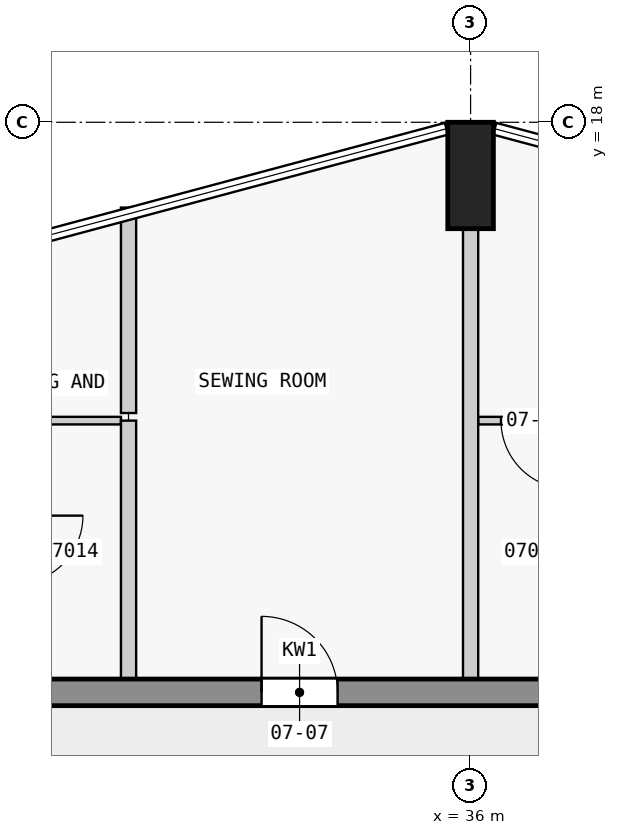
"""IFC4 building model, lengths in metres.
Left out: names, types, materials, properties, quantities, classifications, styles, units other than length and angle.
Written with IfcOpenShell. Run it as: python <this file> out.ifc"""

import sys

from ifc_helpers import new_model, si_unit, direction, frame, frame_2d, origin, origin_2d, place, context, subcontext, project, spatial, rectangle, extrude, element, fill, save


model = new_model("IFC4")
c1 = context("Model", 3, precision=1e-05, world=origin(), true_north=direction((0.0, 1.0)))
c2 = subcontext(c1, "Body", "Model", "MODEL_VIEW")
j1 = project(units=[si_unit("LENGTHUNIT", "METRE"), si_unit("PLANEANGLEUNIT", "RADIAN")], contexts=[c1])
p1 = place(None, origin())
s1 = spatial("IfcSite", under=j1, at=p1, CompositionType="ELEMENT")
p2 = place(p1, origin())
s2 = spatial("IfcBuilding", under=s1, at=p2, CompositionType="ELEMENT")
p3 = place(p2, frame((0.0, 0.0, 33.8)))
s3 = spatial("IfcBuildingStorey", under=s2, at=p3, CompositionType="ELEMENT", Elevation=33.8)
p4 = place(p3, frame((36.0, 17.3, 0.0), z_axis=(0.0, 0.0, 1.0), x_axis=(1.0, 0.0, 0.0)))
e1 = element("IfcColumn", 1, at=p4, inside=s3, PredefinedType="COLUMN", context=c2, shape_type="SweptSolid", body=[
    extrude(rectangle(XDim=0.6, YDim=1.4, at=origin_2d()), origin(), (0.0, 0.0, 1.0), 3.5),
])
p5 = place(p3, frame((22.5, 10.5, 0.0), z_axis=(0.0, 0.0, 1.0), x_axis=(1.0, 0.0, 0.0)))
e2 = element("IfcWall", 2, at=p5, inside=s3, PredefinedType="SHEAR", context=c2, shape_type="SweptSolid", body=[
    extrude(rectangle(XDim=22.5, YDim=0.35, at=frame_2d((11.25, 0.0))), origin(), (0.0, 0.0, 1.0), 3.25),
])
p6 = place(p5, frame((1.75, 0.0, 0.0)))
e3 = element("IfcOpeningElement", 3, at=p6, cuts=e2, PredefinedType="OPENING", context=c2, shape_type="SweptSolid", body=[
    extrude(rectangle(XDim=1.0, YDim=2.1, at=frame_2d((0.5, 1.05))), frame((0.0, 0.185, 0.0), z_axis=(0.0, -1.0, 0.0), x_axis=(1.0, 0.0, 0.0)), (0.0, 0.0, 1.0), 0.37),
])
p7 = place(p5, frame((6.25, 0.0, 0.0)))
e4 = element("IfcOpeningElement", 4, at=p7, cuts=e2, PredefinedType="OPENING", context=c2, shape_type="SweptSolid", body=[
    extrude(rectangle(XDim=1.0, YDim=2.1, at=frame_2d((0.5, 1.05))), frame((0.0, 0.185, 0.0), z_axis=(0.0, -1.0, 0.0), x_axis=(1.0, 0.0, 0.0)), (0.0, 0.0, 1.0), 0.37),
])
p8 = place(p5, frame((10.75, 0.0, 0.0)))
e5 = element("IfcOpeningElement", 5, at=p8, cuts=e2, PredefinedType="OPENING", context=c2, shape_type="SweptSolid", body=[
    extrude(rectangle(XDim=1.0, YDim=2.1, at=frame_2d((0.5, 1.05))), frame((0.0, 0.185, 0.0), z_axis=(0.0, -1.0, 0.0), x_axis=(1.0, 0.0, 0.0)), (0.0, 0.0, 1.0), 0.37),
])
p9 = place(p5, frame((16.85, 0.0, 0.0)))
e6 = element("IfcOpeningElement", 6, at=p9, cuts=e2, PredefinedType="OPENING", context=c2, shape_type="SweptSolid", body=[
    extrude(rectangle(XDim=1.0, YDim=2.1, at=frame_2d((0.5, 1.05))), frame((0.0, 0.185, 0.0), z_axis=(0.0, -1.0, 0.0), x_axis=(1.0, 0.0, 0.0)), (0.0, 0.0, 1.0), 0.37),
])
p10 = place(p3, frame((31.4, 14.075, 0.0), z_axis=(0.0, 0.0, 1.0), x_axis=(-1.0, 0.0, 0.0)))
e7 = element("IfcWall", 7, at=p10, inside=s3, PredefinedType="PARTITIONING", context=c2, shape_type="SweptSolid", body=[
    extrude(rectangle(XDim=1.35, YDim=0.1, at=frame_2d((0.675, 0.0))), origin(), (0.0, 0.0, 1.0), 3.25),
])
p11 = place(p3, frame((37.55, 14.075, 0.0), z_axis=(0.0, 0.0, 1.0), x_axis=(-1.0, 0.0, 0.0)))
e8 = element("IfcWall", 8, at=p11, inside=s3, PredefinedType="PARTITIONING", context=c2, shape_type="SweptSolid", body=[
    extrude(rectangle(XDim=1.45, YDim=0.1, at=frame_2d((0.725, 0.0))), origin(), (0.0, 0.0, 1.0), 3.25),
])
p12 = place(p11, frame((0.25, 0.0, 0.0)))
e9 = element("IfcOpeningElement", 9, at=p12, cuts=e8, PredefinedType="OPENING", context=c2, shape_type="SweptSolid", body=[
    extrude(rectangle(XDim=0.9, YDim=2.1, at=frame_2d((0.45, 1.05))), frame((0.0, 0.06, 0.0), z_axis=(0.0, -1.0, 0.0), x_axis=(1.0, 0.0, 0.0)), (0.0, 0.0, 1.0), 0.12),
])
p13 = place(p3, frame((31.5, 16.878, 0.0), z_axis=(0.0, 0.0, 1.0), x_axis=(0.0, -1.0, 0.0)))
e10 = element("IfcWall", 10, at=p13, inside=s3, PredefinedType="PARTITIONING", context=c2, shape_type="SweptSolid", body=[
    extrude(rectangle(XDim=2.703, YDim=0.2, at=frame_2d((1.351, 0.0))), origin(), (0.0, 0.0, 1.0), 3.25),
])
p14 = place(p3, frame((31.5, 10.675, 0.0), z_axis=(0.0, 0.0, 1.0), x_axis=(0.0, 1.0, 0.0)))
e11 = element("IfcWall", 11, at=p14, inside=s3, PredefinedType="PARTITIONING", context=c2, shape_type="SweptSolid", body=[
    extrude(rectangle(XDim=3.4, YDim=0.2, at=frame_2d((1.7, 0.0))), origin(), (0.0, 0.0, 1.0), 3.25),
])
p15 = place(p3, frame((36.0, 10.675, 0.0), z_axis=(0.0, 0.0, 1.0), x_axis=(0.0, 1.0, 0.0)))
e12 = element("IfcWall", 12, at=p15, inside=s3, PredefinedType="PARTITIONING", context=c2, shape_type="SweptSolid", body=[
    extrude(rectangle(XDim=5.925, YDim=0.2, at=frame_2d((2.962, 0.0))), origin(), (0.0, 0.0, 1.0), 3.25),
])
p16 = place(p8, origin())
e13 = element("IfcDoor", 13, at=p16, inside=s3, OperationType="SINGLE_SWING_LEFT", PredefinedType="DOOR", context=c2, shape_type="SweptSolid", body=[
    extrude(rectangle(XDim=1.0, YDim=2.1, at=frame_2d((0.5, 1.05))), frame((0.0, 0.025, 0.0), z_axis=(0.0, -1.0, 0.0), x_axis=(1.0, 0.0, 0.0)), (0.0, 0.0, 1.0), 0.05),
])
fill(e5, e13)
p17 = place(p12, origin())
e14 = element("IfcDoor", 14, at=p17, inside=s3, OperationType="SINGLE_SWING_LEFT", PredefinedType="DOOR", context=c2, shape_type="SweptSolid", body=[
    extrude(rectangle(XDim=0.9, YDim=2.1, at=frame_2d((0.45, 1.05))), frame((0.0, 0.025, 0.0), z_axis=(0.0, -1.0, 0.0), x_axis=(1.0, 0.0, 0.0)), (0.0, 0.0, 1.0), 0.05),
])
fill(e9, e14)
save(model, sys.argv[1])
